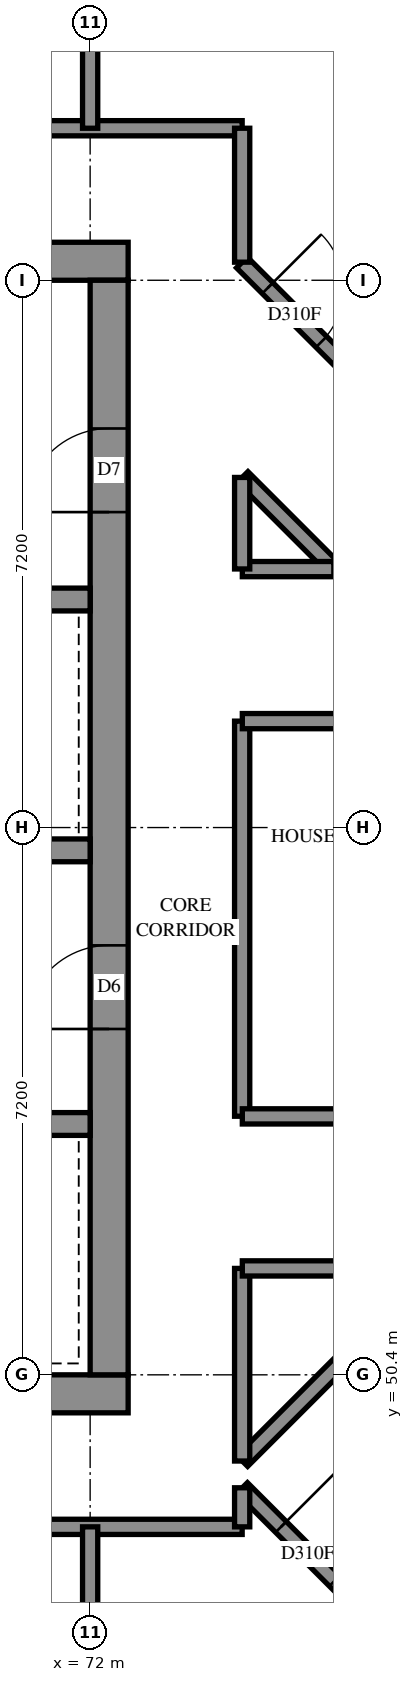
"""IFC4 building model, lengths in metres.
Left out: names, types, materials, properties, quantities, classifications, styles, units other than length and angle.
Written with IfcOpenShell. Run it as: python <this file> out.ifc"""

import sys

from ifc_helpers import new_model, si_unit, direction, frame, frame_2d, origin, place, context, subcontext, project, spatial, rectangle, extrude, element, fill, save


model = new_model("IFC4")
c1 = context("Model", 3, precision=1e-05, world=origin(), true_north=direction((0.0, 1.0)))
c2 = subcontext(c1, "Body", "Model", "MODEL_VIEW")
j1 = project(units=[si_unit("LENGTHUNIT", "METRE"), si_unit("PLANEANGLEUNIT", "RADIAN")], contexts=[c1])
p1 = place(None, origin())
s1 = spatial("IfcSite", under=j1, at=p1, CompositionType="ELEMENT")
p2 = place(p1, origin())
s2 = spatial("IfcBuilding", under=s1, at=p2, CompositionType="ELEMENT")
p3 = place(p2, frame((0.0, 0.0, 227.0)))
s3 = spatial("IfcBuildingStorey", under=s2, at=p3, CompositionType="ELEMENT", Elevation=227.0)
p4 = place(p3, frame((57.1, 50.15, -0.3), z_axis=(0.0, 0.0, 1.0), x_axis=(1.0, 0.0, 0.0)))
e1 = element("IfcWall", 1, at=p4, inside=s3, PredefinedType="SHEAR", context=c2, shape_type="SweptSolid", body=[
    extrude(rectangle(XDim=15.4, YDim=0.5, at=frame_2d((7.7, 0.0))), origin(), (0.0, 0.0, 1.0), 2.7),
])
p5 = place(p3, frame((57.1, 65.05, -0.3), z_axis=(0.0, 0.0, 1.0), x_axis=(1.0, 0.0, 0.0)))
e2 = element("IfcWall", 2, at=p5, inside=s3, PredefinedType="SHEAR", context=c2, shape_type="SweptSolid", body=[
    extrude(rectangle(XDim=15.4, YDim=0.5, at=frame_2d((7.7, 0.0))), origin(), (0.0, 0.0, 1.0), 2.7),
])
p6 = place(p5, frame((10.5, 0.0, 0.3)))
e3 = element("IfcOpeningElement", 3, at=p6, cuts=e2, PredefinedType="OPENING", context=c2, shape_type="SweptSolid", body=[
    extrude(rectangle(XDim=0.8, YDim=2.1, at=frame_2d((0.4, 1.05))), frame((0.0, 0.26, 0.0), z_axis=(0.0, -1.0, 0.0), x_axis=(1.0, 0.0, 0.0)), (0.0, 0.0, 1.0), 0.52),
])
p7 = place(p3, frame((72.25, 50.4, -0.3), z_axis=(0.0, 0.0, 1.0), x_axis=(0.0, 1.0, 0.0)))
e4 = element("IfcWall", 4, at=p7, inside=s3, PredefinedType="SHEAR", context=c2, shape_type="SweptSolid", body=[
    extrude(rectangle(XDim=14.4, YDim=0.5, at=frame_2d((7.2, 0.0))), origin(), (0.0, 0.0, 1.0), 2.7),
])
p8 = place(p7, frame((4.55, 0.0, 0.3)))
e5 = element("IfcOpeningElement", 5, at=p8, cuts=e4, PredefinedType="OPENING", context=c2, shape_type="SweptSolid", body=[
    extrude(rectangle(XDim=1.1, YDim=2.1, at=frame_2d((0.55, 1.05))), frame((0.0, 0.26, 0.0), z_axis=(0.0, -1.0, 0.0), x_axis=(1.0, 0.0, 0.0)), (0.0, 0.0, 1.0), 0.52),
])
p9 = place(p7, frame((11.35, 0.0, 0.3)))
e6 = element("IfcOpeningElement", 6, at=p9, cuts=e4, PredefinedType="OPENING", context=c2, shape_type="SweptSolid", body=[
    extrude(rectangle(XDim=1.1, YDim=2.1, at=frame_2d((0.55, 1.05))), frame((0.0, 0.26, 0.0), z_axis=(0.0, -1.0, 0.0), x_axis=(1.0, 0.0, 0.0)), (0.0, 0.0, 1.0), 0.52),
])
p10 = place(p3, frame((57.6, 53.7, 0.0), z_axis=(0.0, 0.0, 1.0), x_axis=(1.0, 0.0, 0.0)))
e7 = element("IfcWall", 7, at=p10, inside=s3, PredefinedType="SOLIDWALL", context=c2, shape_type="SweptSolid", body=[
    extrude(rectangle(XDim=14.4, YDim=0.3, at=frame_2d((7.2, 0.0))), origin(), (0.0, 0.0, 1.0), 3.1),
])
p11 = place(p10, frame((1.35, 0.0, 0.0)))
e8 = element("IfcOpeningElement", 8, at=p11, cuts=e7, PredefinedType="OPENING", context=c2, shape_type="SweptSolid", body=[
    extrude(rectangle(XDim=0.9, YDim=2.1, at=frame_2d((0.45, 1.05))), frame((0.0, 0.16, 0.0), z_axis=(0.0, -1.0, 0.0), x_axis=(1.0, 0.0, 0.0)), (0.0, 0.0, 1.0), 0.32),
])
p12 = place(p10, frame((4.95, 0.0, 0.0)))
e9 = element("IfcOpeningElement", 9, at=p12, cuts=e7, PredefinedType="OPENING", context=c2, shape_type="SweptSolid", body=[
    extrude(rectangle(XDim=0.9, YDim=2.1, at=frame_2d((0.45, 1.05))), frame((0.0, 0.16, 0.0), z_axis=(0.0, -1.0, 0.0), x_axis=(1.0, 0.0, 0.0)), (0.0, 0.0, 1.0), 0.32),
])
p13 = place(p10, frame((8.55, 0.0, 0.0)))
e10 = element("IfcOpeningElement", 10, at=p13, cuts=e7, PredefinedType="OPENING", context=c2, shape_type="SweptSolid", body=[
    extrude(rectangle(XDim=0.9, YDim=2.1, at=frame_2d((0.45, 1.05))), frame((0.0, 0.16, 0.0), z_axis=(0.0, -1.0, 0.0), x_axis=(1.0, 0.0, 0.0)), (0.0, 0.0, 1.0), 0.32),
])
p14 = place(p10, frame((12.05, 0.0, 0.0)))
e11 = element("IfcOpeningElement", 11, at=p14, cuts=e7, PredefinedType="OPENING", context=c2, shape_type="SweptSolid", body=[
    extrude(rectangle(XDim=1.1, YDim=2.1, at=frame_2d((0.55, 1.05))), frame((0.0, 0.16, 0.0), z_axis=(0.0, -1.0, 0.0), x_axis=(1.0, 0.0, 0.0)), (0.0, 0.0, 1.0), 0.32),
])
p15 = place(p3, frame((57.6, 57.3, 0.0), z_axis=(0.0, 0.0, 1.0), x_axis=(1.0, 0.0, 0.0)))
e12 = element("IfcWall", 12, at=p15, inside=s3, PredefinedType="SOLIDWALL", context=c2, shape_type="SweptSolid", body=[
    extrude(rectangle(XDim=14.4, YDim=0.3, at=frame_2d((7.2, 0.0))), origin(), (0.0, 0.0, 1.0), 3.1),
])
p16 = place(p15, frame((1.25, 0.0, 0.0)))
e13 = element("IfcOpeningElement", 13, at=p16, cuts=e12, PredefinedType="OPENING", context=c2, shape_type="SweptSolid", body=[
    extrude(rectangle(XDim=1.1, YDim=2.1, at=frame_2d((0.55, 1.05))), frame((0.0, 0.16, 0.0), z_axis=(0.0, -1.0, 0.0), x_axis=(1.0, 0.0, 0.0)), (0.0, 0.0, 1.0), 0.32),
])
p17 = place(p15, frame((4.85, 0.0, 0.0)))
e14 = element("IfcOpeningElement", 14, at=p17, cuts=e12, PredefinedType="OPENING", context=c2, shape_type="SweptSolid", body=[
    extrude(rectangle(XDim=1.1, YDim=2.1, at=frame_2d((0.55, 1.05))), frame((0.0, 0.16, 0.0), z_axis=(0.0, -1.0, 0.0), x_axis=(1.0, 0.0, 0.0)), (0.0, 0.0, 1.0), 0.32),
])
p18 = place(p15, frame((8.45, 0.0, 0.0)))
e15 = element("IfcOpeningElement", 15, at=p18, cuts=e12, PredefinedType="OPENING", context=c2, shape_type="SweptSolid", body=[
    extrude(rectangle(XDim=1.1, YDim=2.1, at=frame_2d((0.55, 1.05))), frame((0.0, 0.16, 0.0), z_axis=(0.0, -1.0, 0.0), x_axis=(1.0, 0.0, 0.0)), (0.0, 0.0, 1.0), 0.32),
])
p19 = place(p15, frame((12.05, 0.0, 0.0)))
e16 = element("IfcOpeningElement", 16, at=p19, cuts=e12, PredefinedType="OPENING", context=c2, shape_type="SweptSolid", body=[
    extrude(rectangle(XDim=1.1, YDim=2.1, at=frame_2d((0.55, 1.05))), frame((0.0, 0.16, 0.0), z_axis=(0.0, -1.0, 0.0), x_axis=(1.0, 0.0, 0.0)), (0.0, 0.0, 1.0), 0.32),
])
p20 = place(p3, frame((64.8, 60.6, 0.0), z_axis=(0.0, 0.0, 1.0), x_axis=(1.0, 0.0, 0.0)))
e17 = element("IfcWall", 17, at=p20, inside=s3, PredefinedType="SOLIDWALL", context=c2, shape_type="SweptSolid", body=[
    extrude(rectangle(XDim=7.2, YDim=0.3, at=frame_2d((3.6, 0.0))), origin(), (0.0, 0.0, 1.0), 3.1),
])
p21 = place(p3, frame((55.6, 48.4, 0.0), z_axis=(0.0, 0.0, 1.0), x_axis=(1.0, 0.0, 0.0)))
e18 = element("IfcWall", 18, at=p21, inside=s3, PredefinedType="PARTITIONING", context=c2, shape_type="SweptSolid", body=[
    extrude(rectangle(XDim=18.4, YDim=0.2, at=frame_2d((9.2, 0.0))), origin(), (0.0, 0.0, 1.0), 3.1),
])
p22 = place(p21, frame((5.862, 0.0, 0.0)))
e19 = element("IfcOpeningElement", 19, at=p22, cuts=e18, PredefinedType="OPENING", context=c2, shape_type="SweptSolid", body=[
    extrude(rectangle(XDim=1.0, YDim=2.1, at=frame_2d((0.5, 1.05))), frame((0.0, 0.11, 0.0), z_axis=(0.0, -1.0, 0.0), x_axis=(1.0, 0.0, 0.0)), (0.0, 0.0, 1.0), 0.22),
])
p23 = place(p21, frame((13.061, 0.0, 0.0)))
e20 = element("IfcOpeningElement", 20, at=p23, cuts=e18, PredefinedType="OPENING", context=c2, shape_type="SweptSolid", body=[
    extrude(rectangle(XDim=0.9, YDim=2.1, at=frame_2d((0.45, 1.05))), frame((0.0, 0.11, 0.0), z_axis=(0.0, -1.0, 0.0), x_axis=(1.0, 0.0, 0.0)), (0.0, 0.0, 1.0), 0.22),
])
p24 = place(p3, frame((55.6, 66.8, 0.0), z_axis=(0.0, 0.0, 1.0), x_axis=(1.0, 0.0, 0.0)))
e21 = element("IfcWall", 21, at=p24, inside=s3, PredefinedType="PARTITIONING", context=c2, shape_type="SweptSolid", body=[
    extrude(rectangle(XDim=18.4, YDim=0.2, at=frame_2d((9.2, 0.0))), origin(), (0.0, 0.0, 1.0), 3.1),
])
p25 = place(p24, frame((4.3, 0.0, 0.0)))
e22 = element("IfcOpeningElement", 22, at=p25, cuts=e21, PredefinedType="OPENING", context=c2, shape_type="SweptSolid", body=[
    extrude(rectangle(XDim=0.9, YDim=2.1, at=frame_2d((0.45, 1.05))), frame((0.0, 0.11, 0.0), z_axis=(0.0, -1.0, 0.0), x_axis=(1.0, 0.0, 0.0)), (0.0, 0.0, 1.0), 0.22),
])
p26 = place(p24, frame((6.0, 0.0, 0.0)))
e23 = element("IfcOpeningElement", 23, at=p26, cuts=e21, PredefinedType="OPENING", context=c2, shape_type="SweptSolid", body=[
    extrude(rectangle(XDim=0.9, YDim=2.1, at=frame_2d((0.45, 1.05))), frame((0.0, 0.11, 0.0), z_axis=(0.0, -1.0, 0.0), x_axis=(1.0, 0.0, 0.0)), (0.0, 0.0, 1.0), 0.22),
])
p27 = place(p24, frame((13.367, 0.0, 0.0)))
e24 = element("IfcOpeningElement", 24, at=p27, cuts=e21, PredefinedType="OPENING", context=c2, shape_type="SweptSolid", body=[
    extrude(rectangle(XDim=1.0, YDim=2.1, at=frame_2d((0.5, 1.05))), frame((0.0, 0.11, 0.0), z_axis=(0.0, -1.0, 0.0), x_axis=(1.0, 0.0, 0.0)), (0.0, 0.0, 1.0), 0.22),
])
p28 = place(p3, frame((73.999, 48.911, 0.0), z_axis=(0.0, 0.0, 1.0), x_axis=(0.7071067812, -0.7071067812, 0.0)))
e25 = element("IfcWall", 25, at=p28, inside=s3, PredefinedType="PARTITIONING", context=c2, shape_type="SweptSolid", body=[
    extrude(rectangle(XDim=5.745, YDim=0.2, at=frame_2d((2.872, 0.0))), origin(), (0.0, 0.0, 1.0), 3.1),
])
p29 = place(p28, frame((0.724, 0.0, 0.0)))
e26 = element("IfcOpeningElement", 26, at=p29, cuts=e25, PredefinedType="OPENING", context=c2, shape_type="SweptSolid", body=[
    extrude(rectangle(XDim=1.0, YDim=2.1, at=frame_2d((0.5, 1.05))), frame((0.0, 0.11, 0.0), z_axis=(0.0, -1.0, 0.0), x_axis=(1.0, 0.0, 0.0)), (0.0, 0.0, 1.0), 0.22),
])
p30 = place(p3, frame((73.997, 65.035, 0.0), z_axis=(0.0, 0.0, 1.0), x_axis=(0.7071067812, -0.7071067812, 0.0)))
e27 = element("IfcWall", 27, at=p30, inside=s3, PredefinedType="PARTITIONING", context=c2, shape_type="SweptSolid", body=[
    extrude(rectangle(XDim=5.711, YDim=0.2, at=frame_2d((2.855, 0.0))), origin(), (0.0, 0.0, 1.0), 3.1),
])
p31 = place(p30, frame((0.478, 0.0, 0.0)))
e28 = element("IfcOpeningElement", 28, at=p31, cuts=e27, PredefinedType="OPENING", context=c2, shape_type="SweptSolid", body=[
    extrude(rectangle(XDim=1.0, YDim=2.1, at=frame_2d((0.5, 1.05))), frame((0.0, 0.11, 0.0), z_axis=(0.0, -1.0, 0.0), x_axis=(1.0, 0.0, 0.0)), (0.0, 0.0, 1.0), 0.22),
])
p32 = place(p30, frame((4.538, 0.0, 0.0)))
e29 = element("IfcOpeningElement", 29, at=p32, cuts=e27, PredefinedType="OPENING", context=c2, shape_type="SweptSolid", body=[
    extrude(rectangle(XDim=1.0, YDim=2.1, at=frame_2d((0.5, 1.05))), frame((0.0, 0.11, 0.0), z_axis=(0.0, -1.0, 0.0), x_axis=(1.0, 0.0, 0.0)), (0.0, 0.0, 1.0), 0.22),
])
p33 = place(p3, frame((74.0, 53.802, 0.0), z_axis=(0.0, 0.0, 1.0), x_axis=(0.0, 1.0, 0.0)))
e30 = element("IfcWall", 30, at=p33, inside=s3, PredefinedType="PARTITIONING", context=c2, shape_type="SweptSolid", body=[
    extrude(rectangle(XDim=5.198, YDim=0.2, at=frame_2d((2.599, 0.0))), origin(), (0.0, 0.0, 1.0), 3.1),
])
p34 = place(p3, frame((72.0, 43.6, 0.0), z_axis=(0.0, 0.0, 1.0), x_axis=(0.0, 1.0, 0.0)))
e31 = element("IfcWall", 31, at=p34, inside=s3, PredefinedType="PARTITIONING", context=c2, shape_type="SweptSolid", body=[
    extrude(rectangle(XDim=4.8, YDim=0.2, at=frame_2d((2.4, 0.0))), origin(), (0.0, 0.0, 1.0), 3.1),
])
p35 = place(p3, frame((72.0, 66.8, 0.0), z_axis=(0.0, 0.0, 1.0), x_axis=(0.0, 1.0, 0.0)))
e32 = element("IfcWall", 32, at=p35, inside=s3, PredefinedType="PARTITIONING", context=c2, shape_type="SweptSolid", body=[
    extrude(rectangle(XDim=4.696, YDim=0.2, at=frame_2d((2.348, 0.0))), origin(), (0.0, 0.0, 1.0), 3.1),
])
p36 = place(p3, frame((74.002, 53.8, 0.0), z_axis=(0.0, 0.0, 1.0), x_axis=(1.0, 0.0, 0.0)))
e33 = element("IfcWall", 33, at=p36, inside=s3, PredefinedType="PARTITIONING", context=c2, shape_type="SweptSolid", body=[
    extrude(rectangle(XDim=4.534, YDim=0.2, at=frame_2d((2.267, 0.0))), origin(), (0.0, 0.0, 1.0), 3.1),
])
p37 = place(p36, frame((1.634, 0.0, 0.0)))
e34 = element("IfcOpeningElement", 34, at=p37, cuts=e33, PredefinedType="OPENING", context=c2, shape_type="SweptSolid", body=[
    extrude(rectangle(XDim=1.0, YDim=2.1, at=frame_2d((0.5, 1.05))), frame((0.0, 0.11, 0.0), z_axis=(0.0, -1.0, 0.0), x_axis=(1.0, 0.0, 0.0)), (0.0, 0.0, 1.0), 0.22),
])
p38 = place(p3, frame((74.001, 49.267, 0.0), z_axis=(0.0, 0.0, 1.0), x_axis=(0.7071067812, 0.7071067812, 0.0)))
e35 = element("IfcWall", 35, at=p38, inside=s3, PredefinedType="PARTITIONING", context=c2, shape_type="SweptSolid", body=[
    extrude(rectangle(XDim=3.581, YDim=0.2, at=frame_2d((1.79, 0.0))), origin(), (0.0, 0.0, 1.0), 3.1),
])
p39 = place(p3, frame((74.002, 59.0, 0.0), z_axis=(0.0, 0.0, 1.0), x_axis=(1.0, 0.0, 0.0)))
e36 = element("IfcWall", 36, at=p39, inside=s3, PredefinedType="PARTITIONING", context=c2, shape_type="SweptSolid", body=[
    extrude(rectangle(XDim=3.206, YDim=0.2, at=frame_2d((1.603, 0.0))), origin(), (0.0, 0.0, 1.0), 3.1),
])
p40 = place(p3, frame((74.0, 49.266, 0.0), z_axis=(0.0, 0.0, 1.0), x_axis=(0.0, 1.0, 0.0)))
e37 = element("IfcWall", 37, at=p40, inside=s3, PredefinedType="PARTITIONING", context=c2, shape_type="SweptSolid", body=[
    extrude(rectangle(XDim=2.534, YDim=0.2, at=frame_2d((1.267, 0.0))), origin(), (0.0, 0.0, 1.0), 3.1),
])
p41 = place(p3, frame((74.002, 51.8, 0.0), z_axis=(0.0, 0.0, 1.0), x_axis=(1.0, 0.0, 0.0)))
e38 = element("IfcWall", 38, at=p41, inside=s3, PredefinedType="PARTITIONING", context=c2, shape_type="SweptSolid", body=[
    extrude(rectangle(XDim=2.532, YDim=0.2, at=frame_2d((1.266, 0.0))), origin(), (0.0, 0.0, 1.0), 3.1),
])
p42 = place(p3, frame((74.0, 65.038, 0.0), z_axis=(0.0, 0.0, 1.0), x_axis=(0.0, 1.0, 0.0)))
e39 = element("IfcWall", 39, at=p42, inside=s3, PredefinedType="PARTITIONING", context=c2, shape_type="SweptSolid", body=[
    extrude(rectangle(XDim=1.762, YDim=0.2, at=frame_2d((0.881, 0.0))), origin(), (0.0, 0.0, 1.0), 3.1),
])
p43 = place(p3, frame((74.005, 62.212, 0.0), z_axis=(0.0, 0.0, 1.0), x_axis=(0.7071067812, -0.7071067812, 0.0)))
e40 = element("IfcWall", 40, at=p43, inside=s3, PredefinedType="PARTITIONING", context=c2, shape_type="SweptSolid", body=[
    extrude(rectangle(XDim=1.706, YDim=0.2, at=frame_2d((0.853, 0.0))), origin(), (0.0, 0.0, 1.0), 3.1),
])
for number, where, z_axis, x_axis in (
    (41, (74.002, 61.0, 0.0), (0.0, 0.0, 1.0), (1.0, 0.0, 0.0)),
    (42, (74.0, 61.002, 0.0), (0.0, 0.0, 1.0), (0.0, 1.0, 0.0)),
):
    element("IfcWall", number, at=place(p3, frame(where, z_axis=z_axis, x_axis=x_axis)), inside=s3, PredefinedType="PARTITIONING", context=c2, shape_type="SweptSolid", body=[
        extrude(rectangle(XDim=1.204, YDim=0.2, at=frame_2d((0.602, 0.0))), origin(), (0.0, 0.0, 1.0), 3.1),
    ])
p44 = place(p3, frame((74.0, 48.4, 0.0), z_axis=(0.0, 0.0, 1.0), x_axis=(0.0, 1.0, 0.0)))
e43 = element("IfcWall", 43, at=p44, inside=s3, PredefinedType="PARTITIONING", context=c2, shape_type="SweptSolid", body=[
    extrude(rectangle(XDim=0.514, YDim=0.2, at=frame_2d((0.257, 0.0))), origin(), (0.0, 0.0, 1.0), 3.1),
])
p45 = place(p8, origin())
e44 = element("IfcDoor", 44, at=p45, inside=s3, OperationType="DOUBLE_DOOR_SINGLE_SWING", PredefinedType="DOOR", context=c2, shape_type="SweptSolid", body=[
    extrude(rectangle(XDim=1.1, YDim=2.1, at=frame_2d((0.55, 1.05))), frame((0.0, 0.025, 0.0), z_axis=(0.0, -1.0, 0.0), x_axis=(1.0, 0.0, 0.0)), (0.0, 0.0, 1.0), 0.05),
])
fill(e5, e44)
p46 = place(p9, origin())
e45 = element("IfcDoor", 45, at=p46, inside=s3, OperationType="SINGLE_SWING_RIGHT", PredefinedType="DOOR", context=c2, shape_type="SweptSolid", body=[
    extrude(rectangle(XDim=1.1, YDim=2.1, at=frame_2d((0.55, 1.05))), frame((0.0, 0.025, 0.0), z_axis=(0.0, -1.0, 0.0), x_axis=(1.0, 0.0, 0.0)), (0.0, 0.0, 1.0), 0.05),
])
fill(e6, e45)
p47 = place(p29, origin())
e46 = element("IfcDoor", 46, at=p47, inside=s3, OperationType="SINGLE_SWING_LEFT", PredefinedType="DOOR", context=c2, shape_type="SweptSolid", body=[
    extrude(rectangle(XDim=1.0, YDim=2.1, at=frame_2d((0.5, 1.05))), frame((0.0, 0.025, 0.0), z_axis=(0.0, -1.0, 0.0), x_axis=(1.0, 0.0, 0.0)), (0.0, 0.0, 1.0), 0.05),
])
fill(e26, e46)
p48 = place(p31, origin())
e47 = element("IfcDoor", 47, at=p48, inside=s3, OperationType="SINGLE_SWING_RIGHT", PredefinedType="DOOR", context=c2, shape_type="SweptSolid", body=[
    extrude(rectangle(XDim=1.0, YDim=2.1, at=frame_2d((0.5, 1.05))), frame((0.0, 0.025, 0.0), z_axis=(0.0, -1.0, 0.0), x_axis=(1.0, 0.0, 0.0)), (0.0, 0.0, 1.0), 0.05),
])
fill(e28, e47)
save(model, sys.argv[1])
